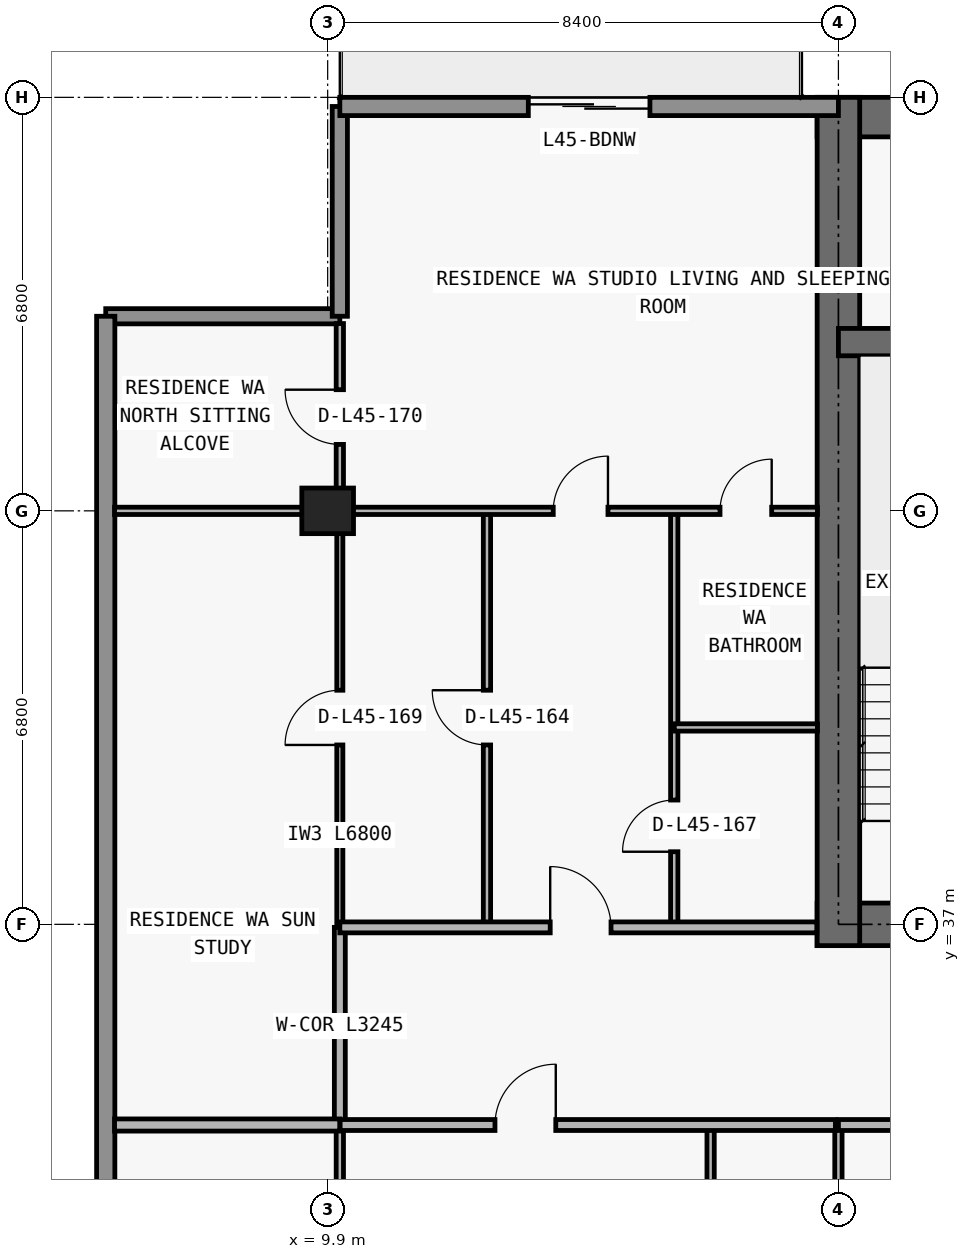
"""IFC4 building model, lengths in metres.
Left out: names, types, materials, properties, quantities, classifications, styles, units other than length and angle.
Written with IfcOpenShell. Run it as: python <this file> out.ifc"""

import sys

from ifc_helpers import new_model, si_unit, direction, frame, frame_2d, origin, origin_2d, place, context, subcontext, project, spatial, rectangle, extrude, element, fill, save


model = new_model("IFC4")
c1 = context("Model", 3, precision=1e-05, world=origin(), true_north=direction((0.0, 1.0)))
c2 = subcontext(c1, "Body", "Model", "MODEL_VIEW")
j1 = project(units=[si_unit("LENGTHUNIT", "METRE"), si_unit("PLANEANGLEUNIT", "RADIAN")], contexts=[c1])
p1 = place(None, origin())
s1 = spatial("IfcSite", under=j1, at=p1, CompositionType="ELEMENT")
p2 = place(p1, origin())
s2 = spatial("IfcBuilding", under=s1, at=p2, CompositionType="ELEMENT")
p3 = place(p2, frame((0.0, 0.0, 163.8)))
s3 = spatial("IfcBuildingStorey", under=s2, at=p3, CompositionType="ELEMENT", Elevation=163.8)
p4 = place(p3, frame((9.9, 43.8, 0.0), z_axis=(0.0, 0.0, 1.0), x_axis=(1.0, 0.0, 0.0)))
e1 = element("IfcColumn", 1, at=p4, inside=s3, PredefinedType="COLUMN", context=c2, shape_type="SweptSolid", body=[
    extrude(rectangle(XDim=0.85, YDim=0.75, at=origin_2d()), origin(), (0.0, 0.0, 1.0), 3.05),
])
p5 = place(p3, frame((17.95, 37.0, 0.0), z_axis=(0.0, 0.0, 1.0), x_axis=(1.0, 0.0, 0.0)))
e2 = element("IfcWall", 2, at=p5, inside=s3, PredefinedType="SHEAR", context=c2, shape_type="SweptSolid", body=[
    extrude(rectangle(XDim=41.9, YDim=0.7, at=frame_2d((20.95, 0.0))), origin(), (0.0, 0.0, 1.0), 3.05),
])
p6 = place(p5, frame((14.35, 0.0, 0.0)))
e3 = element("IfcOpeningElement", 3, at=p6, cuts=e2, PredefinedType="OPENING", context=c2, shape_type="SweptSolid", body=[
    extrude(rectangle(XDim=1.1, YDim=2.15, at=frame_2d((0.55, 1.075))), frame((0.0, 0.36, 0.0), z_axis=(0.0, -1.0, 0.0), x_axis=(1.0, 0.0, 0.0)), (0.0, 0.0, 1.0), 0.72),
])
p7 = place(p5, frame((6.2, 0.0, 0.0)))
e4 = element("IfcOpeningElement", 4, at=p7, cuts=e2, PredefinedType="OPENING", context=c2, shape_type="SweptSolid", body=[
    extrude(rectangle(XDim=1.05, YDim=2.15, at=frame_2d((0.525, 1.075))), frame((0.0, 0.36, 0.0), z_axis=(0.0, -1.0, 0.0), x_axis=(1.0, 0.0, 0.0)), (0.0, 0.0, 1.0), 0.72),
])
p8 = place(p5, frame((34.7, 0.0, 0.0)))
e5 = element("IfcOpeningElement", 5, at=p8, cuts=e2, PredefinedType="OPENING", context=c2, shape_type="SweptSolid", body=[
    extrude(rectangle(XDim=1.05, YDim=2.15, at=frame_2d((0.525, 1.075))), frame((0.0, 0.36, 0.0), z_axis=(0.0, -1.0, 0.0), x_axis=(1.0, 0.0, 0.0)), (0.0, 0.0, 1.0), 0.72),
])
p9 = place(p5, frame((10.812, 0.0, 0.0)))
e6 = element("IfcOpeningElement", 6, at=p9, cuts=e2, PredefinedType="OPENING", context=c2, shape_type="SweptSolid", body=[
    extrude(rectangle(XDim=1.05, YDim=2.15, at=frame_2d((0.525, 1.075))), frame((0.0, 0.36, 0.0), z_axis=(0.0, -1.0, 0.0), x_axis=(1.0, 0.0, 0.0)), (0.0, 0.0, 1.0), 0.72),
])
p10 = place(p5, frame((24.05, 0.0, 0.0)))
e7 = element("IfcOpeningElement", 7, at=p10, cuts=e2, PredefinedType="OPENING", context=c2, shape_type="SweptSolid", body=[
    extrude(rectangle(XDim=1.05, YDim=2.15, at=frame_2d((0.525, 1.075))), frame((0.0, 0.36, 0.0), z_axis=(0.0, -1.0, 0.0), x_axis=(1.0, 0.0, 0.0)), (0.0, 0.0, 1.0), 0.72),
])
p11 = place(p3, frame((17.95, 50.275, 0.0), z_axis=(0.0, 0.0, 1.0), x_axis=(1.0, 0.0, 0.0)))
e8 = element("IfcWall", 8, at=p11, inside=s3, PredefinedType="SHEAR", context=c2, shape_type="SweptSolid", body=[
    extrude(rectangle(XDim=41.9, YDim=0.65, at=frame_2d((20.95, 0.0))), origin(), (0.0, 0.0, 1.0), 3.05),
])
p12 = place(p3, frame((18.3, 36.65, 0.0), z_axis=(0.0, 0.0, 1.0), x_axis=(0.0, 1.0, 0.0)))
e9 = element("IfcWall", 9, at=p12, inside=s3, PredefinedType="SHEAR", context=c2, shape_type="SweptSolid", body=[
    extrude(rectangle(XDim=13.95, YDim=0.7, at=frame_2d((6.975, 0.0))), origin(), (0.0, 0.0, 1.0), 3.05),
])
p13 = place(p3, frame((18.3, 46.575, 0.0), z_axis=(0.0, 0.0, 1.0), x_axis=(1.0, 0.0, 0.0)))
e10 = element("IfcWall", 10, at=p13, inside=s3, PredefinedType="SHEAR", context=c2, shape_type="SweptSolid", body=[
    extrude(rectangle(XDim=41.2, YDim=0.45, at=frame_2d((20.6, 0.0))), origin(), (0.0, 0.0, 1.0), 3.05),
])
p14 = place(p13, frame((7.6, 0.0, 0.0)))
e11 = element("IfcOpeningElement", 11, at=p14, cuts=e10, PredefinedType="OPENING", context=c2, shape_type="SweptSolid", body=[
    extrude(rectangle(XDim=1.0, YDim=2.2, at=frame_2d((0.5, 1.1))), frame((0.0, 0.235, 0.0), z_axis=(0.0, -1.0, 0.0), x_axis=(1.0, 0.0, 0.0)), (0.0, 0.0, 1.0), 0.47),
])
p15 = place(p13, frame((32.625, 0.0, 0.0)))
e12 = element("IfcOpeningElement", 12, at=p15, cuts=e10, PredefinedType="OPENING", context=c2, shape_type="SweptSolid", body=[
    extrude(rectangle(XDim=1.05, YDim=2.15, at=frame_2d((0.525, 1.075))), frame((0.0, 0.235, 0.0), z_axis=(0.0, -1.0, 0.0), x_axis=(1.0, 0.0, 0.0)), (0.0, 0.0, 1.0), 0.47),
])
p16 = place(p3, frame((6.25, 47.0, 0.0), z_axis=(0.0, 0.0, 1.0), x_axis=(1.0, 0.0, 0.0)))
e13 = element("IfcWall", 13, at=p16, inside=s3, PredefinedType="ELEMENTEDWALL", context=c2, shape_type="SweptSolid", body=[
    extrude(rectangle(XDim=3.85, YDim=0.25, at=frame_2d((1.925, 0.0))), origin(), (0.0, 0.0, 1.0), 3.05),
])
p17 = place(p3, frame((10.1, 47.0, 0.0), z_axis=(0.0, 0.0, 1.0), x_axis=(0.0, 1.0, 0.0)))
e14 = element("IfcWall", 14, at=p17, inside=s3, PredefinedType="ELEMENTEDWALL", context=c2, shape_type="SweptSolid", body=[
    extrude(rectangle(XDim=3.45, YDim=0.25, at=frame_2d((1.725, 0.0))), origin(), (0.0, 0.0, 1.0), 3.05),
])
p18 = place(p3, frame((6.25, 29.1, 0.0), z_axis=(0.0, 0.0, 1.0), x_axis=(0.0, 1.0, 0.0)))
e15 = element("IfcWall", 15, at=p18, inside=s3, PredefinedType="STANDARD", context=c2, shape_type="SweptSolid", body=[
    extrude(rectangle(XDim=17.9, YDim=0.3, at=frame_2d((8.95, 0.0))), origin(), (0.0, 0.0, 1.0), 3.05),
])
p19 = place(p3, frame((10.1, 50.45, 0.0), z_axis=(0.0, 0.0, 1.0), x_axis=(1.0, 0.0, 0.0)))
e16 = element("IfcWall", 16, at=p19, inside=s3, PredefinedType="STANDARD", context=c2, shape_type="SweptSolid", body=[
    extrude(rectangle(XDim=8.2, YDim=0.3, at=frame_2d((4.1, 0.0))), origin(), (0.0, 0.0, 1.0), 3.05),
])
p20 = place(p19, frame((3.1, 0.0, 0.0)))
e17 = element("IfcOpeningElement", 17, at=p20, cuts=e16, PredefinedType="OPENING", context=c2, shape_type="SweptSolid", body=[
    extrude(rectangle(XDim=2.0, YDim=2.3, at=frame_2d((1.0, 1.15))), frame((0.0, 0.16, 0.0), z_axis=(0.0, -1.0, 0.0), x_axis=(1.0, 0.0, 0.0)), (0.0, 0.0, 1.0), 0.32),
])
p21 = place(p3, frame((10.1, 29.44, 0.0), z_axis=(0.0, 0.0, 1.0), x_axis=(0.0, 1.0, 0.0)))
e18 = element("IfcWall", 18, at=p21, inside=s3, PredefinedType="PARTITIONING", context=c2, shape_type="SweptSolid", body=[
    extrude(rectangle(XDim=4.26, YDim=0.12, at=frame_2d((2.13, 0.0))), origin(), (0.0, 0.0, 1.0), 2.263),
])
p22 = place(p3, frame((10.1, 33.705, 0.0), z_axis=(0.0, 0.0, 1.0), x_axis=(0.0, 1.0, 0.0)))
e19 = element("IfcWall", 19, at=p22, inside=s3, PredefinedType="PARTITIONING", context=c2, shape_type="SweptSolid", body=[
    extrude(rectangle(XDim=3.245, YDim=0.18, at=frame_2d((1.623, 0.0))), origin(), (0.0, 0.0, 1.0), 2.263),
])
p23 = place(p3, frame((10.1, 37.0, 0.0), z_axis=(0.0, 0.0, 1.0), x_axis=(0.0, 1.0, 0.0)))
e20 = element("IfcWall", 20, at=p23, inside=s3, PredefinedType="MOVABLE", context=c2, shape_type="SweptSolid", body=[
    extrude(rectangle(XDim=6.8, YDim=0.1, at=frame_2d((3.4, 0.0))), origin(), (0.0, 0.0, 1.0), 2.263),
])
p24 = place(p23, frame((2.95, 0.0, 0.0)))
e21 = element("IfcOpeningElement", 21, at=p24, cuts=e20, PredefinedType="OPENING", context=c2, shape_type="SweptSolid", body=[
    extrude(rectangle(XDim=0.9, YDim=2.15, at=frame_2d((0.45, 1.075))), frame((0.0, 0.06, 0.0), z_axis=(0.0, -1.0, 0.0), x_axis=(1.0, 0.0, 0.0)), (0.0, 0.0, 1.0), 0.12),
])
p25 = place(p3, frame((10.1, 43.805, 0.0), z_axis=(0.0, 0.0, 1.0), x_axis=(0.0, 1.0, 0.0)))
e22 = element("IfcWall", 22, at=p25, inside=s3, PredefinedType="PARTITIONING", context=c2, shape_type="SweptSolid", body=[
    extrude(rectangle(XDim=3.075, YDim=0.12, at=frame_2d((1.538, 0.0))), origin(), (0.0, 0.0, 1.0), 3.05),
])
p26 = place(p25, frame((1.087, 0.0, 0.0)))
e23 = element("IfcOpeningElement", 23, at=p26, cuts=e22, PredefinedType="OPENING", context=c2, shape_type="SweptSolid", body=[
    extrude(rectangle(XDim=0.9, YDim=2.15, at=frame_2d((0.45, 1.075))), frame((0.0, 0.07, 0.0), z_axis=(0.0, -1.0, 0.0), x_axis=(1.0, 0.0, 0.0)), (0.0, 0.0, 1.0), 0.14),
])
p27 = place(p3, frame((12.52, 37.0, 0.0), z_axis=(0.0, 0.0, 1.0), x_axis=(0.0, 1.0, 0.0)))
e24 = element("IfcWall", 24, at=p27, inside=s3, PredefinedType="PARTITIONING", context=c2, shape_type="SweptSolid", body=[
    extrude(rectangle(XDim=6.8, YDim=0.12, at=frame_2d((3.4, 0.0))), origin(), (0.0, 0.0, 1.0), 3.05),
])
p28 = place(p27, frame((2.95, 0.0, 0.0)))
e25 = element("IfcOpeningElement", 25, at=p28, cuts=e24, PredefinedType="OPENING", context=c2, shape_type="SweptSolid", body=[
    extrude(rectangle(XDim=0.9, YDim=2.15, at=frame_2d((0.45, 1.075))), frame((0.0, 0.07, 0.0), z_axis=(0.0, -1.0, 0.0), x_axis=(1.0, 0.0, 0.0)), (0.0, 0.0, 1.0), 0.14),
])
p29 = place(p3, frame((15.6, 37.0, 0.0), z_axis=(0.0, 0.0, 1.0), x_axis=(0.0, 1.0, 0.0)))
e26 = element("IfcWall", 26, at=p29, inside=s3, PredefinedType="PARTITIONING", context=c2, shape_type="SweptSolid", body=[
    extrude(rectangle(XDim=6.8, YDim=0.12, at=frame_2d((3.4, 0.0))), origin(), (0.0, 0.0, 1.0), 3.05),
])
p30 = place(p29, frame((1.194, 0.0, 0.0)))
e27 = element("IfcOpeningElement", 27, at=p30, cuts=e26, PredefinedType="OPENING", context=c2, shape_type="SweptSolid", body=[
    extrude(rectangle(XDim=0.85, YDim=2.1, at=frame_2d((0.425, 1.05))), frame((0.0, 0.07, 0.0), z_axis=(0.0, -1.0, 0.0), x_axis=(1.0, 0.0, 0.0)), (0.0, 0.0, 1.0), 0.14),
])
p31 = place(p3, frame((16.198, 29.44, 0.0), z_axis=(0.0, 0.0, 1.0), x_axis=(0.0, 1.0, 0.0)))
e28 = element("IfcWall", 28, at=p31, inside=s3, PredefinedType="PARTITIONING", context=c2, shape_type="SweptSolid", body=[
    extrude(rectangle(XDim=4.26, YDim=0.12, at=frame_2d((2.13, 0.0))), origin(), (0.0, 0.0, 1.0), 2.725),
])
p32 = place(p31, frame((1.705, 0.0, 0.0)))
e29 = element("IfcOpeningElement", 29, at=p32, cuts=e28, PredefinedType="OPENING", context=c2, shape_type="SweptSolid", body=[
    extrude(rectangle(XDim=0.85, YDim=2.1, at=frame_2d((0.425, 1.05))), frame((0.0, 0.07, 0.0), z_axis=(0.0, -1.0, 0.0), x_axis=(1.0, 0.0, 0.0)), (0.0, 0.0, 1.0), 0.14),
])
p33 = place(p3, frame((18.3, 29.44, 0.0), z_axis=(0.0, 0.0, 1.0), x_axis=(0.0, 1.0, 0.0)))
e30 = element("IfcWall", 30, at=p33, inside=s3, PredefinedType="PARTITIONING", context=c2, shape_type="SweptSolid", body=[
    extrude(rectangle(XDim=4.26, YDim=0.12, at=frame_2d((2.13, 0.0))), origin(), (0.0, 0.0, 1.0), 2.263),
])
p34 = place(p3, frame((6.395, 33.7, 0.0), z_axis=(0.0, 0.0, 1.0), x_axis=(1.0, 0.0, 0.0)))
e31 = element("IfcWall", 31, at=p34, inside=s3, PredefinedType="PARTITIONING", context=c2, shape_type="SweptSolid", body=[
    extrude(rectangle(XDim=3.705, YDim=0.2, at=frame_2d((1.853, 0.0))), origin(), (0.0, 0.0, 1.0), 3.05),
])
p35 = place(p3, frame((10.105, 33.7, 0.0), z_axis=(0.0, 0.0, 1.0), x_axis=(1.0, 0.0, 0.0)))
e32 = element("IfcWall", 32, at=p35, inside=s3, PredefinedType="PARTITIONING", context=c2, shape_type="SweptSolid", body=[
    extrude(rectangle(XDim=8.145, YDim=0.18, at=frame_2d((4.073, 0.0))), origin(), (0.0, 0.0, 1.0), 3.05),
])
p36 = place(p35, frame((2.546, 0.0, 0.0)))
e33 = element("IfcOpeningElement", 33, at=p36, cuts=e32, PredefinedType="OPENING", context=c2, shape_type="SweptSolid", body=[
    extrude(rectangle(XDim=1.0, YDim=2.2, at=frame_2d((0.5, 1.1))), frame((0.0, 0.1, 0.0), z_axis=(0.0, -1.0, 0.0), x_axis=(1.0, 0.0, 0.0)), (0.0, 0.0, 1.0), 0.2),
])
p37 = place(p3, frame((18.3, 33.7, 0.0), z_axis=(0.0, 0.0, 1.0), x_axis=(1.0, 0.0, 0.0)))
e34 = element("IfcWall", 34, at=p37, inside=s3, PredefinedType="PARTITIONING", context=c2, shape_type="SweptSolid", body=[
    extrude(rectangle(XDim=20.372, YDim=0.18, at=frame_2d((10.186, 0.0))), origin(), (0.0, 0.0, 1.0), 3.05),
])
p38 = place(p37, frame((10.891, 0.0, 0.0)))
e35 = element("IfcOpeningElement", 35, at=p38, cuts=e34, PredefinedType="OPENING", context=c2, shape_type="SweptSolid", body=[
    extrude(rectangle(XDim=1.0, YDim=2.2, at=frame_2d((0.5, 1.1))), frame((0.0, 0.1, 0.0), z_axis=(0.0, -1.0, 0.0), x_axis=(1.0, 0.0, 0.0)), (0.0, 0.0, 1.0), 0.2),
])
p39 = place(p37, frame((18.086, 0.0, 0.0)))
e36 = element("IfcOpeningElement", 36, at=p39, cuts=e34, PredefinedType="OPENING", context=c2, shape_type="SweptSolid", body=[
    extrude(rectangle(XDim=1.0, YDim=2.2, at=frame_2d((0.5, 1.1))), frame((0.0, 0.1, 0.0), z_axis=(0.0, -1.0, 0.0), x_axis=(1.0, 0.0, 0.0)), (0.0, 0.0, 1.0), 0.2),
])
p40 = place(p3, frame((10.1, 36.95, 0.0), z_axis=(0.0, 0.0, 1.0), x_axis=(1.0, 0.0, 0.0)))
e37 = element("IfcWall", 37, at=p40, inside=s3, PredefinedType="PARTITIONING", context=c2, shape_type="SweptSolid", body=[
    extrude(rectangle(XDim=7.845, YDim=0.18, at=frame_2d((3.922, 0.0))), origin(), (0.0, 0.0, 1.0), 3.05),
])
p41 = place(p40, frame((3.46, 0.0, 0.0)))
e38 = element("IfcOpeningElement", 38, at=p41, cuts=e37, PredefinedType="OPENING", context=c2, shape_type="SweptSolid", body=[
    extrude(rectangle(XDim=1.0, YDim=2.2, at=frame_2d((0.5, 1.1))), frame((0.0, 0.1, 0.0), z_axis=(0.0, -1.0, 0.0), x_axis=(1.0, 0.0, 0.0)), (0.0, 0.0, 1.0), 0.2),
])
p42 = place(p3, frame((15.6, 40.238, 0.0), z_axis=(0.0, 0.0, 1.0), x_axis=(1.0, 0.0, 0.0)))
e39 = element("IfcWall", 39, at=p42, inside=s3, PredefinedType="PARTITIONING", context=c2, shape_type="SweptSolid", body=[
    extrude(rectangle(XDim=2.355, YDim=0.12, at=frame_2d((1.177, 0.0))), origin(), (0.0, 0.0, 1.0), 3.05),
])
p43 = place(p3, frame((6.395, 43.8, 0.0), z_axis=(0.0, 0.0, 1.0), x_axis=(1.0, 0.0, 0.0)))
e40 = element("IfcWall", 40, at=p43, inside=s3, PredefinedType="PARTITIONING", context=c2, shape_type="SweptSolid", body=[
    extrude(rectangle(XDim=11.56, YDim=0.12, at=frame_2d((5.78, 0.0))), origin(), (0.0, 0.0, 1.0), 2.418),
])
p44 = place(p43, frame((7.215, 0.0, 0.0)))
e41 = element("IfcOpeningElement", 41, at=p44, cuts=e40, PredefinedType="OPENING", context=c2, shape_type="SweptSolid", body=[
    extrude(rectangle(XDim=0.9, YDim=2.15, at=frame_2d((0.45, 1.075))), frame((0.0, 0.07, 0.0), z_axis=(0.0, -1.0, 0.0), x_axis=(1.0, 0.0, 0.0)), (0.0, 0.0, 1.0), 0.14),
])
p45 = place(p43, frame((9.958, 0.0, 0.0)))
e42 = element("IfcOpeningElement", 42, at=p45, cuts=e40, PredefinedType="OPENING", context=c2, shape_type="SweptSolid", body=[
    extrude(rectangle(XDim=0.85, YDim=2.1, at=frame_2d((0.425, 1.05))), frame((0.0, 0.07, 0.0), z_axis=(0.0, -1.0, 0.0), x_axis=(1.0, 0.0, 0.0)), (0.0, 0.0, 1.0), 0.14),
])
p46 = place(p20, origin())
e43 = element("IfcDoor", 43, at=p46, inside=s3, OperationType="DOUBLE_DOOR_SLIDING", PredefinedType="DOOR", context=c2, shape_type="SweptSolid", body=[
    extrude(rectangle(XDim=2.0, YDim=2.3, at=frame_2d((1.0, 1.15))), frame((0.0, 0.025, 0.0), z_axis=(0.0, -1.0, 0.0), x_axis=(1.0, 0.0, 0.0)), (0.0, 0.0, 1.0), 0.05),
])
fill(e17, e43)
p47 = place(p36, origin())
e44 = element("IfcDoor", 44, at=p47, inside=s3, OperationType="SINGLE_SWING_RIGHT", PredefinedType="DOOR", context=c2, shape_type="SweptSolid", body=[
    extrude(rectangle(XDim=1.0, YDim=2.2, at=frame_2d((0.5, 1.1))), frame((0.0, 0.025, 0.0), z_axis=(0.0, -1.0, 0.0), x_axis=(1.0, 0.0, 0.0)), (0.0, 0.0, 1.0), 0.05),
])
fill(e33, e44)
p48 = place(p28, origin())
e45 = element("IfcDoor", 45, at=p48, inside=s3, OperationType="SINGLE_SWING_RIGHT", PredefinedType="DOOR", context=c2, shape_type="SweptSolid", body=[
    extrude(rectangle(XDim=0.9, YDim=2.15, at=frame_2d((0.45, 1.075))), frame((0.0, 0.025, 0.0), z_axis=(0.0, -1.0, 0.0), x_axis=(1.0, 0.0, 0.0)), (0.0, 0.0, 1.0), 0.05),
])
fill(e25, e45)
p49 = place(p41, origin())
e46 = element("IfcDoor", 46, at=p49, inside=s3, OperationType="SINGLE_SWING_LEFT", PredefinedType="DOOR", context=c2, shape_type="SweptSolid", body=[
    extrude(rectangle(XDim=1.0, YDim=2.2, at=frame_2d((0.5, 1.1))), frame((0.0, 0.025, 0.0), z_axis=(0.0, -1.0, 0.0), x_axis=(1.0, 0.0, 0.0)), (0.0, 0.0, 1.0), 0.05),
])
fill(e38, e46)
p50 = place(p44, origin())
e47 = element("IfcDoor", 47, at=p50, inside=s3, OperationType="SINGLE_SWING_RIGHT", PredefinedType="DOOR", context=c2, shape_type="SweptSolid", body=[
    extrude(rectangle(XDim=0.9, YDim=2.15, at=frame_2d((0.45, 1.075))), frame((0.0, 0.025, 0.0), z_axis=(0.0, -1.0, 0.0), x_axis=(1.0, 0.0, 0.0)), (0.0, 0.0, 1.0), 0.05),
])
fill(e41, e47)
p51 = place(p30, origin())
e48 = element("IfcDoor", 48, at=p51, inside=s3, OperationType="SINGLE_SWING_LEFT", PredefinedType="DOOR", context=c2, shape_type="SweptSolid", body=[
    extrude(rectangle(XDim=0.85, YDim=2.1, at=frame_2d((0.425, 1.05))), frame((0.0, 0.025, 0.0), z_axis=(0.0, -1.0, 0.0), x_axis=(1.0, 0.0, 0.0)), (0.0, 0.0, 1.0), 0.05),
])
fill(e27, e48)
p52 = place(p45, origin())
e49 = element("IfcDoor", 49, at=p52, inside=s3, OperationType="SINGLE_SWING_RIGHT", PredefinedType="DOOR", context=c2, shape_type="SweptSolid", body=[
    extrude(rectangle(XDim=0.85, YDim=2.1, at=frame_2d((0.425, 1.05))), frame((0.0, 0.025, 0.0), z_axis=(0.0, -1.0, 0.0), x_axis=(1.0, 0.0, 0.0)), (0.0, 0.0, 1.0), 0.05),
])
fill(e42, e49)
p53 = place(p24, origin())
e50 = element("IfcDoor", 50, at=p53, inside=s3, OperationType="SINGLE_SWING_LEFT", PredefinedType="DOOR", context=c2, shape_type="SweptSolid", body=[
    extrude(rectangle(XDim=0.9, YDim=2.15, at=frame_2d((0.45, 1.075))), frame((0.0, 0.025, 0.0), z_axis=(0.0, -1.0, 0.0), x_axis=(1.0, 0.0, 0.0)), (0.0, 0.0, 1.0), 0.05),
])
fill(e21, e50)
p54 = place(p26, origin())
e51 = element("IfcDoor", 51, at=p54, inside=s3, OperationType="SINGLE_SWING_RIGHT", PredefinedType="DOOR", context=c2, shape_type="SweptSolid", body=[
    extrude(rectangle(XDim=0.9, YDim=2.15, at=frame_2d((0.45, 1.075))), frame((0.0, 0.025, 0.0), z_axis=(0.0, -1.0, 0.0), x_axis=(1.0, 0.0, 0.0)), (0.0, 0.0, 1.0), 0.05),
])
fill(e23, e51)
save(model, sys.argv[1])
